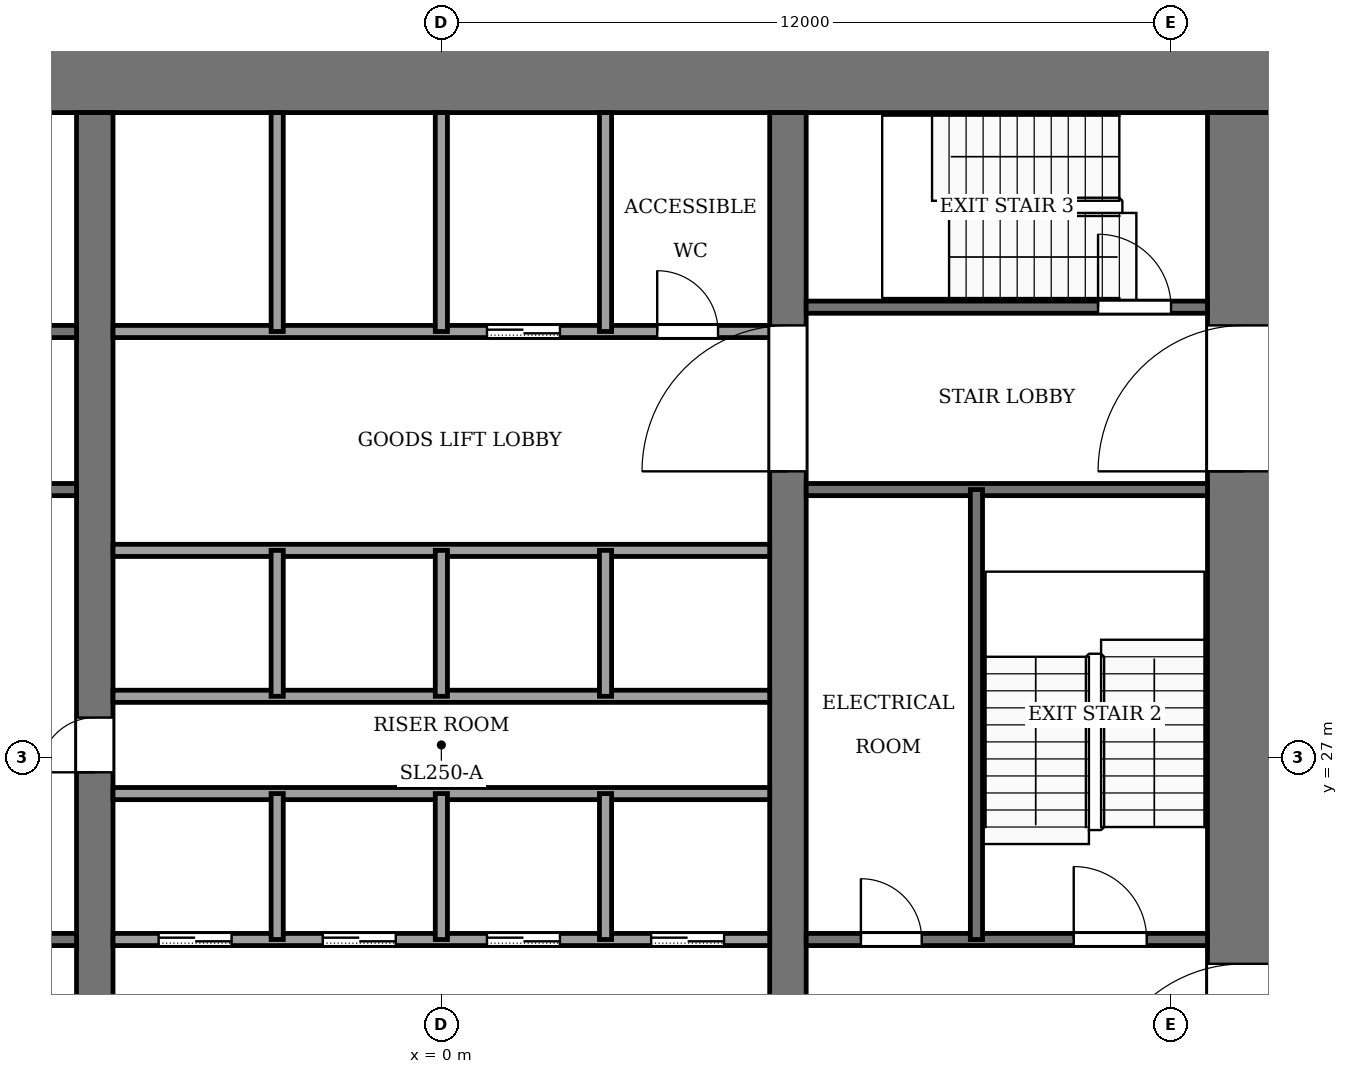
"""IFC4 building model, lengths in metres.
Left out: names, types, materials, properties, quantities, classifications, styles, units other than length and angle.
Written with IfcOpenShell. Run it as: python <this file> out.ifc"""

import sys

from ifc_helpers import new_model, si_unit, direction, frame, frame_2d, origin, place, context, subcontext, project, spatial, rectangle, extrude, element, fill, save


model = new_model("IFC4")
c1 = context("Model", 3, precision=1e-05, world=origin(), true_north=direction((0.0, 1.0)))
c2 = subcontext(c1, "Body", "Model", "MODEL_VIEW")
j1 = project(units=[si_unit("LENGTHUNIT", "METRE"), si_unit("PLANEANGLEUNIT", "RADIAN")], contexts=[c1])
p1 = place(None, origin())
s1 = spatial("IfcSite", under=j1, at=p1, CompositionType="ELEMENT")
p2 = place(p1, origin())
s2 = spatial("IfcBuilding", under=s1, at=p2, CompositionType="ELEMENT")
p3 = place(p2, frame((0.0, 0.0, 86.0)))
s3 = spatial("IfcBuildingStorey", under=s2, at=p3, CompositionType="ELEMENT", Elevation=86.0)
p4 = place(p3, frame((-13.8, 38.2, -0.13), z_axis=(0.0, 0.0, 1.0), x_axis=(1.0, 0.0, 0.0)))
e1 = element("IfcWall", 1, at=p4, inside=s3, PredefinedType="SHEAR", context=c2, shape_type="SweptSolid", body=[
    extrude(rectangle(XDim=27.6, YDim=1.2, at=frame_2d((13.8, 0.0))), origin(), (0.0, 0.0, 1.0), 4.0),
])
p5 = place(p3, frame((13.2, 18.4, -0.13), z_axis=(0.0, 0.0, 1.0), x_axis=(0.0, 1.0, 0.0)))
e2 = element("IfcWall", 2, at=p5, inside=s3, PredefinedType="SHEAR", context=c2, shape_type="SweptSolid", body=[
    extrude(rectangle(XDim=19.2, YDim=1.2, at=frame_2d((9.6, 0.0))), origin(), (0.0, 0.0, 1.0), 4.0),
])
p6 = place(p5, frame((2.8, 0.0, 0.13)))
e3 = element("IfcOpeningElement", 3, at=p6, cuts=e2, PredefinedType="OPENING", context=c2, shape_type="SweptSolid", body=[
    extrude(rectangle(XDim=2.4, YDim=2.4, at=frame_2d((1.2, 1.2))), frame((0.0, 0.61, 0.0), z_axis=(0.0, -1.0, 0.0), x_axis=(1.0, 0.0, 0.0)), (0.0, 0.0, 1.0), 1.22),
])
p7 = place(p5, frame((13.3, 0.0, 0.13)))
e4 = element("IfcOpeningElement", 4, at=p7, cuts=e2, PredefinedType="OPENING", context=c2, shape_type="SweptSolid", body=[
    extrude(rectangle(XDim=2.4, YDim=2.4, at=frame_2d((1.2, 1.2))), frame((0.0, 0.61, 0.0), z_axis=(0.0, -1.0, 0.0), x_axis=(1.0, 0.0, 0.0)), (0.0, 0.0, 1.0), 1.22),
])
p8 = place(p3, frame((-5.7, 18.4, -0.13), z_axis=(0.0, 0.0, 1.0), x_axis=(0.0, 1.0, 0.0)))
e5 = element("IfcWall", 5, at=p8, inside=s3, PredefinedType="SHEAR", context=c2, shape_type="SweptSolid", body=[
    extrude(rectangle(XDim=19.2, YDim=0.6, at=frame_2d((9.6, 0.0))), origin(), (0.0, 0.0, 1.0), 4.0),
])
p9 = place(p8, frame((8.35, 0.0, 0.13)))
e6 = element("IfcOpeningElement", 6, at=p9, cuts=e5, PredefinedType="OPENING", context=c2, shape_type="SweptSolid", body=[
    extrude(rectangle(XDim=0.9, YDim=2.1, at=frame_2d((0.45, 1.05))), frame((0.0, 0.31, 0.0), z_axis=(0.0, -1.0, 0.0), x_axis=(1.0, 0.0, 0.0)), (0.0, 0.0, 1.0), 0.62),
])
p10 = place(p3, frame((5.7, 18.4, -0.13), z_axis=(0.0, 0.0, 1.0), x_axis=(0.0, 1.0, 0.0)))
e7 = element("IfcWall", 7, at=p10, inside=s3, PredefinedType="SHEAR", context=c2, shape_type="SweptSolid", body=[
    extrude(rectangle(XDim=19.2, YDim=0.6, at=frame_2d((9.6, 0.0))), origin(), (0.0, 0.0, 1.0), 4.0),
])
p11 = place(p10, frame((13.3, 0.0, 0.13)))
e8 = element("IfcOpeningElement", 8, at=p11, cuts=e7, PredefinedType="OPENING", context=c2, shape_type="SweptSolid", body=[
    extrude(rectangle(XDim=2.4, YDim=2.4, at=frame_2d((1.2, 1.2))), frame((0.0, 0.31, 0.0), z_axis=(0.0, -1.0, 0.0), x_axis=(1.0, 0.0, 0.0)), (0.0, 0.0, 1.0), 0.62),
])
p12 = place(p3, frame((-12.6, 24.0, 0.0), z_axis=(0.0, 0.0, 1.0), x_axis=(1.0, 0.0, 0.0)))
e9 = element("IfcWall", 9, at=p12, inside=s3, PredefinedType="PARTITIONING", context=c2, shape_type="SweptSolid", body=[
    extrude(rectangle(XDim=6.6, YDim=0.2, at=frame_2d((3.3, 0.0))), origin(), (0.0, 0.0, 1.0), 3.87),
])
p13 = place(p12, frame((4.7, 0.0, 0.0)))
e10 = element("IfcOpeningElement", 10, at=p13, cuts=e9, PredefinedType="OPENING", context=c2, shape_type="SweptSolid", body=[
    extrude(rectangle(XDim=1.0, YDim=2.1, at=frame_2d((0.5, 1.05))), frame((0.0, 0.11, 0.0), z_axis=(0.0, -1.0, 0.0), x_axis=(1.0, 0.0, 0.0)), (0.0, 0.0, 1.0), 0.22),
])
p14 = place(p3, frame((-5.4, 24.0, 0.0), z_axis=(0.0, 0.0, 1.0), x_axis=(1.0, 0.0, 0.0)))
e11 = element("IfcWall", 11, at=p14, inside=s3, PredefinedType="PARTITIONING", context=c2, shape_type="SweptSolid", body=[
    extrude(rectangle(XDim=10.8, YDim=0.2, at=frame_2d((5.4, 0.0))), origin(), (0.0, 0.0, 1.0), 3.87),
])
p15 = place(p14, frame((0.75, 0.0, 0.0)))
e12 = element("IfcOpeningElement", 12, at=p15, cuts=e11, PredefinedType="OPENING", context=c2, shape_type="SweptSolid", body=[
    extrude(rectangle(XDim=1.2, YDim=2.2, at=frame_2d((0.6, 1.1))), frame((0.0, 0.11, 0.0), z_axis=(0.0, -1.0, 0.0), x_axis=(1.0, 0.0, 0.0)), (0.0, 0.0, 1.0), 0.22),
])
p16 = place(p14, frame((3.45, 0.0, 0.0)))
e13 = element("IfcOpeningElement", 13, at=p16, cuts=e11, PredefinedType="OPENING", context=c2, shape_type="SweptSolid", body=[
    extrude(rectangle(XDim=1.2, YDim=2.2, at=frame_2d((0.6, 1.1))), frame((0.0, 0.11, 0.0), z_axis=(0.0, -1.0, 0.0), x_axis=(1.0, 0.0, 0.0)), (0.0, 0.0, 1.0), 0.22),
])
p17 = place(p14, frame((6.15, 0.0, 0.0)))
e14 = element("IfcOpeningElement", 14, at=p17, cuts=e11, PredefinedType="OPENING", context=c2, shape_type="SweptSolid", body=[
    extrude(rectangle(XDim=1.2, YDim=2.2, at=frame_2d((0.6, 1.1))), frame((0.0, 0.11, 0.0), z_axis=(0.0, -1.0, 0.0), x_axis=(1.0, 0.0, 0.0)), (0.0, 0.0, 1.0), 0.22),
])
p18 = place(p14, frame((8.85, 0.0, 0.0)))
e15 = element("IfcOpeningElement", 15, at=p18, cuts=e11, PredefinedType="OPENING", context=c2, shape_type="SweptSolid", body=[
    extrude(rectangle(XDim=1.2, YDim=2.2, at=frame_2d((0.6, 1.1))), frame((0.0, 0.11, 0.0), z_axis=(0.0, -1.0, 0.0), x_axis=(1.0, 0.0, 0.0)), (0.0, 0.0, 1.0), 0.22),
])
p19 = place(p3, frame((6.0, 24.0, 0.0), z_axis=(0.0, 0.0, 1.0), x_axis=(1.0, 0.0, 0.0)))
e16 = element("IfcWall", 16, at=p19, inside=s3, PredefinedType="PARTITIONING", context=c2, shape_type="SweptSolid", body=[
    extrude(rectangle(XDim=6.6, YDim=0.2, at=frame_2d((3.3, 0.0))), origin(), (0.0, 0.0, 1.0), 3.87),
])
p20 = place(p19, frame((0.9, 0.0, 0.0)))
e17 = element("IfcOpeningElement", 17, at=p20, cuts=e16, PredefinedType="OPENING", context=c2, shape_type="SweptSolid", body=[
    extrude(rectangle(XDim=1.0, YDim=2.1, at=frame_2d((0.5, 1.05))), frame((0.0, 0.11, 0.0), z_axis=(0.0, -1.0, 0.0), x_axis=(1.0, 0.0, 0.0)), (0.0, 0.0, 1.0), 0.22),
])
p21 = place(p19, frame((4.4, 0.0, 0.0)))
e18 = element("IfcOpeningElement", 18, at=p21, cuts=e16, PredefinedType="OPENING", context=c2, shape_type="SweptSolid", body=[
    extrude(rectangle(XDim=1.2, YDim=2.2, at=frame_2d((0.6, 1.1))), frame((0.0, 0.11, 0.0), z_axis=(0.0, -1.0, 0.0), x_axis=(1.0, 0.0, 0.0)), (0.0, 0.0, 1.0), 0.22),
])
for number, where, z_axis, x_axis in (
    (19, (-5.4, 26.4, 0.0), (0.0, 0.0, 1.0), (1.0, 0.0, 0.0)),
    (20, (-5.4, 28.0, 0.0), (0.0, 0.0, 1.0), (1.0, 0.0, 0.0)),
    (21, (-5.4, 30.4, 0.0), (0.0, 0.0, 1.0), (1.0, 0.0, 0.0)),
):
    element("IfcWall", number, at=place(p3, frame(where, z_axis=z_axis, x_axis=x_axis)), inside=s3, PredefinedType="PARTITIONING", context=c2, shape_type="SweptSolid", body=[
        extrude(rectangle(XDim=10.8, YDim=0.2, at=frame_2d((5.4, 0.0))), origin(), (0.0, 0.0, 1.0), 3.87),
    ])
p22 = place(p3, frame((-12.6, 31.4, 0.0), z_axis=(0.0, 0.0, 1.0), x_axis=(1.0, 0.0, 0.0)))
e22 = element("IfcWall", 22, at=p22, inside=s3, PredefinedType="PARTITIONING", context=c2, shape_type="SweptSolid", body=[
    extrude(rectangle(XDim=6.6, YDim=0.2, at=frame_2d((3.3, 0.0))), origin(), (0.0, 0.0, 1.0), 3.87),
])
p23 = place(p22, frame((1.0, 0.0, 0.0)))
e23 = element("IfcOpeningElement", 23, at=p23, cuts=e22, PredefinedType="OPENING", context=c2, shape_type="SweptSolid", body=[
    extrude(rectangle(XDim=1.2, YDim=2.2, at=frame_2d((0.6, 1.1))), frame((0.0, 0.11, 0.0), z_axis=(0.0, -1.0, 0.0), x_axis=(1.0, 0.0, 0.0)), (0.0, 0.0, 1.0), 0.22),
])
p24 = place(p3, frame((6.0, 31.4, 0.0), z_axis=(0.0, 0.0, 1.0), x_axis=(1.0, 0.0, 0.0)))
e24 = element("IfcWall", 24, at=p24, inside=s3, PredefinedType="PARTITIONING", context=c2, shape_type="SweptSolid", body=[
    extrude(rectangle(XDim=6.6, YDim=0.2, at=frame_2d((3.3, 0.0))), origin(), (0.0, 0.0, 1.0), 3.87),
])
p25 = place(p3, frame((-12.6, 34.0, 0.0), z_axis=(0.0, 0.0, 1.0), x_axis=(1.0, 0.0, 0.0)))
e25 = element("IfcWall", 25, at=p25, inside=s3, PredefinedType="PARTITIONING", context=c2, shape_type="SweptSolid", body=[
    extrude(rectangle(XDim=6.6, YDim=0.2, at=frame_2d((3.3, 0.0))), origin(), (0.0, 0.0, 1.0), 3.87),
])
p26 = place(p25, frame((4.7, 0.0, 0.0)))
e26 = element("IfcOpeningElement", 26, at=p26, cuts=e25, PredefinedType="OPENING", context=c2, shape_type="SweptSolid", body=[
    extrude(rectangle(XDim=1.4, YDim=2.2, at=frame_2d((0.7, 1.1))), frame((0.0, 0.11, 0.0), z_axis=(0.0, -1.0, 0.0), x_axis=(1.0, 0.0, 0.0)), (0.0, 0.0, 1.0), 0.22),
])
p27 = place(p25, frame((2.3, 0.0, 0.0)))
e27 = element("IfcOpeningElement", 27, at=p27, cuts=e25, PredefinedType="OPENING", context=c2, shape_type="SweptSolid", body=[
    extrude(rectangle(XDim=1.4, YDim=2.2, at=frame_2d((0.7, 1.1))), frame((0.0, 0.11, 0.0), z_axis=(0.0, -1.0, 0.0), x_axis=(1.0, 0.0, 0.0)), (0.0, 0.0, 1.0), 0.22),
])
p28 = place(p25, frame((0.45, 0.0, 0.0)))
e28 = element("IfcOpeningElement", 28, at=p28, cuts=e25, PredefinedType="OPENING", context=c2, shape_type="SweptSolid", body=[
    extrude(rectangle(XDim=0.9, YDim=2.1, at=frame_2d((0.45, 1.05))), frame((0.0, 0.11, 0.0), z_axis=(0.0, -1.0, 0.0), x_axis=(1.0, 0.0, 0.0)), (0.0, 0.0, 1.0), 0.22),
])
p29 = place(p3, frame((-5.4, 34.0, 0.0), z_axis=(0.0, 0.0, 1.0), x_axis=(1.0, 0.0, 0.0)))
e29 = element("IfcWall", 29, at=p29, inside=s3, PredefinedType="PARTITIONING", context=c2, shape_type="SweptSolid", body=[
    extrude(rectangle(XDim=10.8, YDim=0.2, at=frame_2d((5.4, 0.0))), origin(), (0.0, 0.0, 1.0), 3.87),
])
p30 = place(p29, frame((6.15, 0.0, 0.0)))
e30 = element("IfcOpeningElement", 30, at=p30, cuts=e29, PredefinedType="OPENING", context=c2, shape_type="SweptSolid", body=[
    extrude(rectangle(XDim=1.2, YDim=2.2, at=frame_2d((0.6, 1.1))), frame((0.0, 0.11, 0.0), z_axis=(0.0, -1.0, 0.0), x_axis=(1.0, 0.0, 0.0)), (0.0, 0.0, 1.0), 0.22),
])
p31 = place(p29, frame((8.95, 0.0, 0.0)))
e31 = element("IfcOpeningElement", 31, at=p31, cuts=e29, PredefinedType="OPENING", context=c2, shape_type="SweptSolid", body=[
    extrude(rectangle(XDim=1.0, YDim=2.1, at=frame_2d((0.5, 1.05))), frame((0.0, 0.11, 0.0), z_axis=(0.0, -1.0, 0.0), x_axis=(1.0, 0.0, 0.0)), (0.0, 0.0, 1.0), 0.22),
])
p32 = place(p3, frame((6.0, 34.4, 0.0), z_axis=(0.0, 0.0, 1.0), x_axis=(1.0, 0.0, 0.0)))
e32 = element("IfcWall", 32, at=p32, inside=s3, PredefinedType="PARTITIONING", context=c2, shape_type="SweptSolid", body=[
    extrude(rectangle(XDim=6.6, YDim=0.2, at=frame_2d((3.3, 0.0))), origin(), (0.0, 0.0, 1.0), 3.87),
])
p33 = place(p32, frame((4.8, 0.0, 0.0)))
e33 = element("IfcOpeningElement", 33, at=p33, cuts=e32, PredefinedType="OPENING", context=c2, shape_type="SweptSolid", body=[
    extrude(rectangle(XDim=1.2, YDim=2.2, at=frame_2d((0.6, 1.1))), frame((0.0, 0.11, 0.0), z_axis=(0.0, -1.0, 0.0), x_axis=(1.0, 0.0, 0.0)), (0.0, 0.0, 1.0), 0.22),
])
for number, where, z_axis, x_axis in (
    (34, (-2.7, 24.0, 0.0), (0.0, 0.0, 1.0), (0.0, 1.0, 0.0)),
    (35, (-2.7, 28.0, 0.0), (0.0, 0.0, 1.0), (0.0, 1.0, 0.0)),
):
    element("IfcWall", number, at=place(p3, frame(where, z_axis=z_axis, x_axis=x_axis)), inside=s3, PredefinedType="PARTITIONING", context=c2, shape_type="SweptSolid", body=[
        extrude(rectangle(XDim=2.4, YDim=0.2, at=frame_2d((1.2, 0.0))), origin(), (0.0, 0.0, 1.0), 3.87),
    ])
p34 = place(p3, frame((-2.7, 34.0, 0.0), z_axis=(0.0, 0.0, 1.0), x_axis=(0.0, 1.0, 0.0)))
e36 = element("IfcWall", 36, at=p34, inside=s3, PredefinedType="PARTITIONING", context=c2, shape_type="SweptSolid", body=[
    extrude(rectangle(XDim=3.6, YDim=0.2, at=frame_2d((1.8, 0.0))), origin(), (0.0, 0.0, 1.0), 3.87),
])
for number, where, z_axis, x_axis in (
    (37, (0.0, 24.0, 0.0), (0.0, 0.0, 1.0), (0.0, 1.0, 0.0)),
    (38, (0.0, 28.0, 0.0), (0.0, 0.0, 1.0), (0.0, 1.0, 0.0)),
):
    element("IfcWall", number, at=place(p3, frame(where, z_axis=z_axis, x_axis=x_axis)), inside=s3, PredefinedType="PARTITIONING", context=c2, shape_type="SweptSolid", body=[
        extrude(rectangle(XDim=2.4, YDim=0.2, at=frame_2d((1.2, 0.0))), origin(), (0.0, 0.0, 1.0), 3.87),
    ])
p35 = place(p3, frame((0.0, 34.0, 0.0), z_axis=(0.0, 0.0, 1.0), x_axis=(0.0, 1.0, 0.0)))
e39 = element("IfcWall", 39, at=p35, inside=s3, PredefinedType="PARTITIONING", context=c2, shape_type="SweptSolid", body=[
    extrude(rectangle(XDim=3.6, YDim=0.2, at=frame_2d((1.8, 0.0))), origin(), (0.0, 0.0, 1.0), 3.87),
])
for number, where, z_axis, x_axis in (
    (40, (2.7, 24.0, 0.0), (0.0, 0.0, 1.0), (0.0, 1.0, 0.0)),
    (41, (2.7, 28.0, 0.0), (0.0, 0.0, 1.0), (0.0, 1.0, 0.0)),
):
    element("IfcWall", number, at=place(p3, frame(where, z_axis=z_axis, x_axis=x_axis)), inside=s3, PredefinedType="PARTITIONING", context=c2, shape_type="SweptSolid", body=[
        extrude(rectangle(XDim=2.4, YDim=0.2, at=frame_2d((1.2, 0.0))), origin(), (0.0, 0.0, 1.0), 3.87),
    ])
p36 = place(p3, frame((2.7, 34.0, 0.0), z_axis=(0.0, 0.0, 1.0), x_axis=(0.0, 1.0, 0.0)))
e42 = element("IfcWall", 42, at=p36, inside=s3, PredefinedType="PARTITIONING", context=c2, shape_type="SweptSolid", body=[
    extrude(rectangle(XDim=3.6, YDim=0.2, at=frame_2d((1.8, 0.0))), origin(), (0.0, 0.0, 1.0), 3.87),
])
p37 = place(p3, frame((8.8, 24.0, 0.0), z_axis=(0.0, 0.0, 1.0), x_axis=(0.0, 1.0, 0.0)))
e43 = element("IfcWall", 43, at=p37, inside=s3, PredefinedType="PARTITIONING", context=c2, shape_type="SweptSolid", body=[
    extrude(rectangle(XDim=7.4, YDim=0.2, at=frame_2d((3.7, 0.0))), origin(), (0.0, 0.0, 1.0), 3.87),
])
p38 = place(p15, origin())
e44 = element("IfcDoor", 44, at=p38, inside=s3, OperationType="SLIDING_TO_LEFT", PredefinedType="DOOR", context=c2, shape_type="SweptSolid", body=[
    extrude(rectangle(XDim=1.2, YDim=2.2, at=frame_2d((0.6, 1.1))), frame((0.0, 0.025, 0.0), z_axis=(0.0, -1.0, 0.0), x_axis=(1.0, 0.0, 0.0)), (0.0, 0.0, 1.0), 0.05),
])
fill(e12, e44)
p39 = place(p16, origin())
e45 = element("IfcDoor", 45, at=p39, inside=s3, OperationType="SLIDING_TO_LEFT", PredefinedType="DOOR", context=c2, shape_type="SweptSolid", body=[
    extrude(rectangle(XDim=1.2, YDim=2.2, at=frame_2d((0.6, 1.1))), frame((0.0, 0.025, 0.0), z_axis=(0.0, -1.0, 0.0), x_axis=(1.0, 0.0, 0.0)), (0.0, 0.0, 1.0), 0.05),
])
fill(e13, e45)
p40 = place(p17, origin())
e46 = element("IfcDoor", 46, at=p40, inside=s3, OperationType="SLIDING_TO_LEFT", PredefinedType="DOOR", context=c2, shape_type="SweptSolid", body=[
    extrude(rectangle(XDim=1.2, YDim=2.2, at=frame_2d((0.6, 1.1))), frame((0.0, 0.025, 0.0), z_axis=(0.0, -1.0, 0.0), x_axis=(1.0, 0.0, 0.0)), (0.0, 0.0, 1.0), 0.05),
])
fill(e14, e46)
p41 = place(p18, origin())
e47 = element("IfcDoor", 47, at=p41, inside=s3, OperationType="SLIDING_TO_LEFT", PredefinedType="DOOR", context=c2, shape_type="SweptSolid", body=[
    extrude(rectangle(XDim=1.2, YDim=2.2, at=frame_2d((0.6, 1.1))), frame((0.0, 0.025, 0.0), z_axis=(0.0, -1.0, 0.0), x_axis=(1.0, 0.0, 0.0)), (0.0, 0.0, 1.0), 0.05),
])
fill(e15, e47)
p42 = place(p30, origin())
e48 = element("IfcDoor", 48, at=p42, inside=s3, OperationType="SLIDING_TO_LEFT", PredefinedType="DOOR", context=c2, shape_type="SweptSolid", body=[
    extrude(rectangle(XDim=1.2, YDim=2.2, at=frame_2d((0.6, 1.1))), frame((0.0, 0.025, 0.0), z_axis=(0.0, -1.0, 0.0), x_axis=(1.0, 0.0, 0.0)), (0.0, 0.0, 1.0), 0.05),
])
fill(e30, e48)
p43 = place(p20, origin())
e49 = element("IfcDoor", 49, at=p43, inside=s3, OperationType="SINGLE_SWING_LEFT", PredefinedType="DOOR", context=c2, shape_type="SweptSolid", body=[
    extrude(rectangle(XDim=1.0, YDim=2.1, at=frame_2d((0.5, 1.05))), frame((0.0, 0.025, 0.0), z_axis=(0.0, -1.0, 0.0), x_axis=(1.0, 0.0, 0.0)), (0.0, 0.0, 1.0), 0.05),
])
fill(e17, e49)
p44 = place(p31, origin())
e50 = element("IfcDoor", 50, at=p44, inside=s3, OperationType="SINGLE_SWING_LEFT", PredefinedType="DOOR", context=c2, shape_type="SweptSolid", body=[
    extrude(rectangle(XDim=1.0, YDim=2.1, at=frame_2d((0.5, 1.05))), frame((0.0, 0.025, 0.0), z_axis=(0.0, -1.0, 0.0), x_axis=(1.0, 0.0, 0.0)), (0.0, 0.0, 1.0), 0.05),
])
fill(e31, e50)
p45 = place(p9, origin())
e51 = element("IfcDoor", 51, at=p45, inside=s3, OperationType="SINGLE_SWING_RIGHT", PredefinedType="DOOR", context=c2, shape_type="SweptSolid", body=[
    extrude(rectangle(XDim=0.9, YDim=2.1, at=frame_2d((0.45, 1.05))), frame((0.0, 0.025, 0.0), z_axis=(0.0, -1.0, 0.0), x_axis=(1.0, 0.0, 0.0)), (0.0, 0.0, 1.0), 0.05),
])
fill(e6, e51)
p46 = place(p21, origin())
e52 = element("IfcDoor", 52, at=p46, inside=s3, OperationType="SINGLE_SWING_LEFT", PredefinedType="DOOR", context=c2, shape_type="SweptSolid", body=[
    extrude(rectangle(XDim=1.2, YDim=2.2, at=frame_2d((0.6, 1.1))), frame((0.0, 0.025, 0.0), z_axis=(0.0, -1.0, 0.0), x_axis=(1.0, 0.0, 0.0)), (0.0, 0.0, 1.0), 0.05),
])
fill(e18, e52)
p47 = place(p33, origin())
e53 = element("IfcDoor", 53, at=p47, inside=s3, OperationType="SINGLE_SWING_RIGHT", PredefinedType="DOOR", context=c2, shape_type="SweptSolid", body=[
    extrude(rectangle(XDim=1.2, YDim=2.2, at=frame_2d((0.6, 1.1))), frame((0.0, 0.025, 0.0), z_axis=(0.0, -1.0, 0.0), x_axis=(1.0, 0.0, 0.0)), (0.0, 0.0, 1.0), 0.05),
])
fill(e33, e53)
p48 = place(p11, origin())
e54 = element("IfcDoor", 54, at=p48, inside=s3, OperationType="DOUBLE_DOOR_SINGLE_SWING", PredefinedType="DOOR", context=c2, shape_type="SweptSolid", body=[
    extrude(rectangle(XDim=2.4, YDim=2.4, at=frame_2d((1.2, 1.2))), frame((0.0, 0.025, 0.0), z_axis=(0.0, -1.0, 0.0), x_axis=(1.0, 0.0, 0.0)), (0.0, 0.0, 1.0), 0.05),
])
fill(e8, e54)
p49 = place(p6, origin())
e55 = element("IfcDoor", 55, at=p49, inside=s3, OperationType="DOUBLE_DOOR_SINGLE_SWING", PredefinedType="DOOR", context=c2, shape_type="SweptSolid", body=[
    extrude(rectangle(XDim=2.4, YDim=2.4, at=frame_2d((1.2, 1.2))), frame((0.0, 0.025, 0.0), z_axis=(0.0, -1.0, 0.0), x_axis=(1.0, 0.0, 0.0)), (0.0, 0.0, 1.0), 0.05),
])
fill(e3, e55)
p50 = place(p7, origin())
e56 = element("IfcDoor", 56, at=p50, inside=s3, OperationType="DOUBLE_DOOR_SINGLE_SWING", PredefinedType="DOOR", context=c2, shape_type="SweptSolid", body=[
    extrude(rectangle(XDim=2.4, YDim=2.4, at=frame_2d((1.2, 1.2))), frame((0.0, 0.025, 0.0), z_axis=(0.0, -1.0, 0.0), x_axis=(1.0, 0.0, 0.0)), (0.0, 0.0, 1.0), 0.05),
])
fill(e4, e56)
save(model, sys.argv[1])
